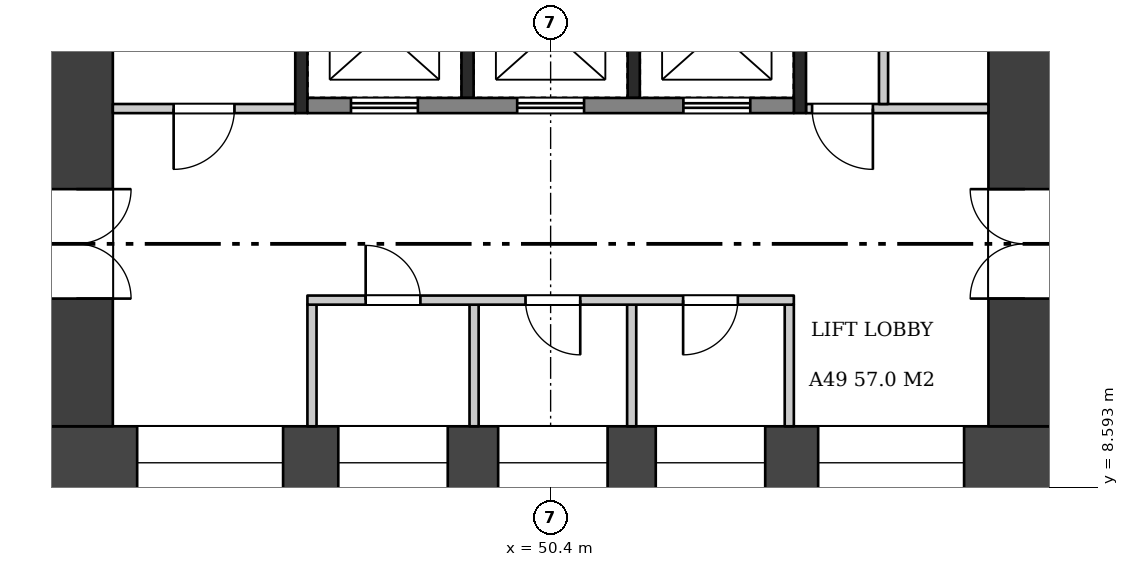
"""IFC4 building model, lengths in metres.
Left out: names, types, materials, properties, quantities, classifications, styles, units other than length and angle.
Written with IfcOpenShell. Run it as: python <this file> out.ifc"""

import sys

from ifc_helpers import new_model, si_unit, direction, frame, frame_2d, origin, place, context, subcontext, project, spatial, rectangle, extrude, element, fill, save


model = new_model("IFC4")
c1 = context("Model", 3, precision=1e-05, world=origin(), true_north=direction((0.0, 1.0)))
c2 = subcontext(c1, "Body", "Model", "MODEL_VIEW")
j1 = project(units=[si_unit("LENGTHUNIT", "METRE"), si_unit("PLANEANGLEUNIT", "RADIAN")], contexts=[c1])
p1 = place(None, origin())
s1 = spatial("IfcSite", under=j1, at=p1, CompositionType="ELEMENT")
p2 = place(p1, origin())
s2 = spatial("IfcBuilding", under=s1, at=p2, CompositionType="ELEMENT")
p3 = place(p2, frame((0.0, 0.0, 189.7)))
s3 = spatial("IfcBuildingStorey", under=s2, at=p3, CompositionType="ELEMENT", Elevation=189.7)
p4 = place(p3, frame((42.0, 9.0, 0.0), z_axis=(0.0, 0.0, 1.0), x_axis=(1.0, 0.0, 0.0)))
e1 = element("IfcWall", 1, at=p4, inside=s3, PredefinedType="SHEAR", context=c2, shape_type="SweptSolid", body=[
    extrude(rectangle(XDim=16.8, YDim=1.2, at=frame_2d((8.4, 0.0))), origin(), (0.0, 0.0, 1.0), 3.22),
])
p5 = place(p4, frame((1.6, 0.0, 0.6)))
e2 = element("IfcOpeningElement", 2, at=p5, cuts=e1, PredefinedType="OPENING", context=c2, shape_type="SweptSolid", body=[
    extrude(rectangle(XDim=2.4, YDim=2.1, at=frame_2d((1.2, 1.05))), frame((0.0, 0.61, 0.0), z_axis=(0.0, -1.0, 0.0), x_axis=(1.0, 0.0, 0.0)), (0.0, 0.0, 1.0), 1.22),
])
p6 = place(p4, frame((4.908, 0.0, 1.6)))
e3 = element("IfcOpeningElement", 3, at=p6, cuts=e1, PredefinedType="OPENING", context=c2, shape_type="SweptSolid", body=[
    extrude(rectangle(XDim=1.8, YDim=1.2, at=frame_2d((0.9, 0.6))), frame((0.0, 0.61, 0.0), z_axis=(0.0, -1.0, 0.0), x_axis=(1.0, 0.0, 0.0)), (0.0, 0.0, 1.0), 1.22),
])
p7 = place(p4, frame((7.537, 0.0, 1.6)))
e4 = element("IfcOpeningElement", 4, at=p7, cuts=e1, PredefinedType="OPENING", context=c2, shape_type="SweptSolid", body=[
    extrude(rectangle(XDim=1.8, YDim=1.2, at=frame_2d((0.9, 0.6))), frame((0.0, 0.61, 0.0), z_axis=(0.0, -1.0, 0.0), x_axis=(1.0, 0.0, 0.0)), (0.0, 0.0, 1.0), 1.22),
])
p8 = place(p4, frame((10.129, 0.0, 1.6)))
e5 = element("IfcOpeningElement", 5, at=p8, cuts=e1, PredefinedType="OPENING", context=c2, shape_type="SweptSolid", body=[
    extrude(rectangle(XDim=1.8, YDim=1.2, at=frame_2d((0.9, 0.6))), frame((0.0, 0.61, 0.0), z_axis=(0.0, -1.0, 0.0), x_axis=(1.0, 0.0, 0.0)), (0.0, 0.0, 1.0), 1.22),
])
p9 = place(p4, frame((12.8, 0.0, 0.6)))
e6 = element("IfcOpeningElement", 6, at=p9, cuts=e1, PredefinedType="OPENING", context=c2, shape_type="SweptSolid", body=[
    extrude(rectangle(XDim=2.4, YDim=2.1, at=frame_2d((1.2, 1.05))), frame((0.0, 0.61, 0.0), z_axis=(0.0, -1.0, 0.0), x_axis=(1.0, 0.0, 0.0)), (0.0, 0.0, 1.0), 1.22),
])
p10 = place(p3, frame((42.6, 9.6, 0.0), z_axis=(0.0, 0.0, 1.0), x_axis=(0.0, 1.0, 0.0)))
e7 = element("IfcWall", 7, at=p10, inside=s3, PredefinedType="SHEAR", context=c2, shape_type="SweptSolid", body=[
    extrude(rectangle(XDim=14.4, YDim=1.2, at=frame_2d((7.2, 0.0))), origin(), (0.0, 0.0, 1.0), 3.22),
])
p11 = place(p10, frame((2.1, 0.0, 0.0)))
e8 = element("IfcOpeningElement", 8, at=p11, cuts=e7, PredefinedType="OPENING", context=c2, shape_type="SweptSolid", body=[
    extrude(rectangle(XDim=1.8, YDim=2.1, at=frame_2d((0.9, 1.05))), frame((0.0, 0.61, 0.0), z_axis=(0.0, -1.0, 0.0), x_axis=(1.0, 0.0, 0.0)), (0.0, 0.0, 1.0), 1.22),
])
p12 = place(p3, frame((58.2, 9.6, 0.0), z_axis=(0.0, 0.0, 1.0), x_axis=(0.0, 1.0, 0.0)))
e9 = element("IfcWall", 9, at=p12, inside=s3, PredefinedType="SHEAR", context=c2, shape_type="SweptSolid", body=[
    extrude(rectangle(XDim=14.4, YDim=1.2, at=frame_2d((7.2, 0.0))), origin(), (0.0, 0.0, 1.0), 3.22),
])
p13 = place(p12, frame((2.1, 0.0, 0.0)))
e10 = element("IfcOpeningElement", 10, at=p13, cuts=e9, PredefinedType="OPENING", context=c2, shape_type="SweptSolid", body=[
    extrude(rectangle(XDim=1.8, YDim=2.1, at=frame_2d((0.9, 1.05))), frame((0.0, 0.61, 0.0), z_axis=(0.0, -1.0, 0.0), x_axis=(1.0, 0.0, 0.0)), (0.0, 0.0, 1.0), 1.22),
])
for number, where, z_axis, x_axis in (
    (11, (46.475, 9.6, 0.0), (0.0, 0.0, 1.0), (0.0, 1.0, 0.0)),
    (12, (54.325, 9.6, 0.0), (0.0, 0.0, 1.0), (0.0, 1.0, 0.0)),
    (13, (49.141, 9.6, 0.0), (0.0, 0.0, 1.0), (0.0, 1.0, 0.0)),
    (14, (51.733, 9.6, 0.0), (0.0, 0.0, 1.0), (0.0, 1.0, 0.0)),
):
    element("IfcWall", number, at=place(p3, frame(where, z_axis=z_axis, x_axis=x_axis)), inside=s3, PredefinedType="PARTITIONING", context=c2, shape_type="SweptSolid", body=[
        extrude(rectangle(XDim=2.0, YDim=0.15, at=frame_2d((1.0, 0.0))), origin(), (0.0, 0.0, 1.0), 3.22),
    ])
p14 = place(p3, frame((46.4, 11.675, 0.0), z_axis=(0.0, 0.0, 1.0), x_axis=(1.0, 0.0, 0.0)))
e15 = element("IfcWall", 15, at=p14, inside=s3, PredefinedType="PARTITIONING", context=c2, shape_type="SweptSolid", body=[
    extrude(rectangle(XDim=8.0, YDim=0.15, at=frame_2d((4.0, 0.0))), origin(), (0.0, 0.0, 1.0), 3.22),
])
p15 = place(p14, frame((0.958, 0.0, 0.0)))
e16 = element("IfcOpeningElement", 16, at=p15, cuts=e15, PredefinedType="OPENING", context=c2, shape_type="SweptSolid", body=[
    extrude(rectangle(XDim=0.9, YDim=2.1, at=frame_2d((0.45, 1.05))), frame((0.0, 0.085, 0.0), z_axis=(0.0, -1.0, 0.0), x_axis=(1.0, 0.0, 0.0)), (0.0, 0.0, 1.0), 0.17),
])
p16 = place(p14, frame((3.587, 0.0, 0.0)))
e17 = element("IfcOpeningElement", 17, at=p16, cuts=e15, PredefinedType="OPENING", context=c2, shape_type="SweptSolid", body=[
    extrude(rectangle(XDim=0.9, YDim=2.1, at=frame_2d((0.45, 1.05))), frame((0.0, 0.085, 0.0), z_axis=(0.0, -1.0, 0.0), x_axis=(1.0, 0.0, 0.0)), (0.0, 0.0, 1.0), 0.17),
])
p17 = place(p14, frame((6.179, 0.0, 0.0)))
e18 = element("IfcOpeningElement", 18, at=p17, cuts=e15, PredefinedType="OPENING", context=c2, shape_type="SweptSolid", body=[
    extrude(rectangle(XDim=0.9, YDim=2.1, at=frame_2d((0.45, 1.05))), frame((0.0, 0.085, 0.0), z_axis=(0.0, -1.0, 0.0), x_axis=(1.0, 0.0, 0.0)), (0.0, 0.0, 1.0), 0.17),
])
for number, where, z_axis, x_axis in (
    (19, (49.033, 15.0, 0.0), (0.0, 0.0, 1.0), (0.0, 1.0, 0.0)),
    (20, (51.767, 15.0, 0.0), (0.0, 0.0, 1.0), (0.0, 1.0, 0.0)),
):
    element("IfcWall", number, at=place(p3, frame(where, z_axis=z_axis, x_axis=x_axis)), inside=s3, PredefinedType="SHEAR", context=c2, shape_type="SweptSolid", body=[
        extrude(rectangle(XDim=1.9, YDim=0.2, at=frame_2d((0.95, 0.0))), origin(), (0.0, 0.0, 1.0), 3.22),
    ])
p18 = place(p3, frame((46.4, 14.875, 0.0), z_axis=(0.0, 0.0, 1.0), x_axis=(1.0, 0.0, 0.0)))
e21 = element("IfcWall", 21, at=p18, inside=s3, PredefinedType="SHEAR", context=c2, shape_type="SweptSolid", body=[
    extrude(rectangle(XDim=8.0, YDim=0.25, at=frame_2d((4.0, 0.0))), origin(), (0.0, 0.0, 1.0), 3.22),
])
p19 = place(p18, frame((0.717, 0.0, 0.0)))
e22 = element("IfcOpeningElement", 22, at=p19, cuts=e21, PredefinedType="OPENING", context=c2, shape_type="SweptSolid", body=[
    extrude(rectangle(XDim=1.1, YDim=2.1, at=frame_2d((0.55, 1.05))), frame((0.0, 0.135, 0.0), z_axis=(0.0, -1.0, 0.0), x_axis=(1.0, 0.0, 0.0)), (0.0, 0.0, 1.0), 0.27),
])
p20 = place(p18, frame((3.45, 0.0, 0.0)))
e23 = element("IfcOpeningElement", 23, at=p20, cuts=e21, PredefinedType="OPENING", context=c2, shape_type="SweptSolid", body=[
    extrude(rectangle(XDim=1.1, YDim=2.1, at=frame_2d((0.55, 1.05))), frame((0.0, 0.135, 0.0), z_axis=(0.0, -1.0, 0.0), x_axis=(1.0, 0.0, 0.0)), (0.0, 0.0, 1.0), 0.27),
])
p21 = place(p18, frame((6.183, 0.0, 0.0)))
e24 = element("IfcOpeningElement", 24, at=p21, cuts=e21, PredefinedType="OPENING", context=c2, shape_type="SweptSolid", body=[
    extrude(rectangle(XDim=1.1, YDim=2.1, at=frame_2d((0.55, 1.05))), frame((0.0, 0.135, 0.0), z_axis=(0.0, -1.0, 0.0), x_axis=(1.0, 0.0, 0.0)), (0.0, 0.0, 1.0), 0.27),
])
p22 = place(p3, frame((46.3, 14.75, 0.0), z_axis=(0.0, 0.0, 1.0), x_axis=(0.0, 1.0, 0.0)))
e25 = element("IfcWall", 25, at=p22, inside=s3, PredefinedType="SHEAR", context=c2, shape_type="SweptSolid", body=[
    extrude(rectangle(XDim=2.4, YDim=0.2, at=frame_2d((1.2, 0.0))), origin(), (0.0, 0.0, 1.0), 3.22),
])
p23 = place(p3, frame((43.2, 14.825, 0.0), z_axis=(0.0, 0.0, 1.0), x_axis=(1.0, 0.0, 0.0)))
e26 = element("IfcWall", 26, at=p23, inside=s3, PredefinedType="PARTITIONING", context=c2, shape_type="SweptSolid", body=[
    extrude(rectangle(XDim=3.0, YDim=0.15, at=frame_2d((1.5, 0.0))), origin(), (0.0, 0.0, 1.0), 3.22),
])
p24 = place(p23, frame((1.0, 0.0, 0.0)))
e27 = element("IfcOpeningElement", 27, at=p24, cuts=e26, PredefinedType="OPENING", context=c2, shape_type="SweptSolid", body=[
    extrude(rectangle(XDim=1.0, YDim=2.1, at=frame_2d((0.5, 1.05))), frame((0.0, 0.085, 0.0), z_axis=(0.0, -1.0, 0.0), x_axis=(1.0, 0.0, 0.0)), (0.0, 0.0, 1.0), 0.17),
])
p25 = place(p3, frame((54.5, 14.75, 0.0), z_axis=(0.0, 0.0, 1.0), x_axis=(0.0, 1.0, 0.0)))
e28 = element("IfcWall", 28, at=p25, inside=s3, PredefinedType="SHEAR", context=c2, shape_type="SweptSolid", body=[
    extrude(rectangle(XDim=9.25, YDim=0.2, at=frame_2d((4.625, 0.0))), origin(), (0.0, 0.0, 1.0), 3.22),
])
p26 = place(p3, frame((54.6, 14.825, 0.0), z_axis=(0.0, 0.0, 1.0), x_axis=(1.0, 0.0, 0.0)))
e29 = element("IfcWall", 29, at=p26, inside=s3, PredefinedType="PARTITIONING", context=c2, shape_type="SweptSolid", body=[
    extrude(rectangle(XDim=3.0, YDim=0.15, at=frame_2d((1.5, 0.0))), origin(), (0.0, 0.0, 1.0), 3.22),
])
p27 = place(p26, frame((0.1, 0.0, 0.0)))
e30 = element("IfcOpeningElement", 30, at=p27, cuts=e29, PredefinedType="OPENING", context=c2, shape_type="SweptSolid", body=[
    extrude(rectangle(XDim=1.0, YDim=2.1, at=frame_2d((0.5, 1.05))), frame((0.0, 0.085, 0.0), z_axis=(0.0, -1.0, 0.0), x_axis=(1.0, 0.0, 0.0)), (0.0, 0.0, 1.0), 0.17),
])
p28 = place(p3, frame((55.875, 14.9, 0.0), z_axis=(0.0, 0.0, 1.0), x_axis=(0.0, 1.0, 0.0)))
e31 = element("IfcWall", 31, at=p28, inside=s3, PredefinedType="PARTITIONING", context=c2, shape_type="SweptSolid", body=[
    extrude(rectangle(XDim=9.1, YDim=0.15, at=frame_2d((4.55, 0.0))), origin(), (0.0, 0.0, 1.0), 3.22),
])
p29 = place(p28, frame((1.04, 0.0, 0.0)))
e32 = element("IfcOpeningElement", 32, at=p29, cuts=e31, PredefinedType="OPENING", context=c2, shape_type="SweptSolid", body=[
    extrude(rectangle(XDim=1.0, YDim=2.1, at=frame_2d((0.5, 1.05))), frame((0.0, 0.085, 0.0), z_axis=(0.0, -1.0, 0.0), x_axis=(1.0, 0.0, 0.0)), (0.0, 0.0, 1.0), 0.17),
])
p30 = place(p28, frame((4.32, 0.0, 0.0)))
e33 = element("IfcOpeningElement", 33, at=p30, cuts=e31, PredefinedType="OPENING", context=c2, shape_type="SweptSolid", body=[
    extrude(rectangle(XDim=0.9, YDim=2.1, at=frame_2d((0.45, 1.05))), frame((0.0, 0.085, 0.0), z_axis=(0.0, -1.0, 0.0), x_axis=(1.0, 0.0, 0.0)), (0.0, 0.0, 1.0), 0.17),
])
p31 = place(p28, frame((7.33, 0.0, 0.0)))
e34 = element("IfcOpeningElement", 34, at=p31, cuts=e31, PredefinedType="OPENING", context=c2, shape_type="SweptSolid", body=[
    extrude(rectangle(XDim=0.9, YDim=2.1, at=frame_2d((0.45, 1.05))), frame((0.0, 0.085, 0.0), z_axis=(0.0, -1.0, 0.0), x_axis=(1.0, 0.0, 0.0)), (0.0, 0.0, 1.0), 0.17),
])
p32 = place(p11, frame((1.8, 0.0, 0.0), z_axis=(0.0, 0.0, 1.0), x_axis=(-1.0, 0.0, 0.0)))
e35 = element("IfcDoor", 35, at=p32, inside=s3, OperationType="DOUBLE_DOOR_SINGLE_SWING", PredefinedType="DOOR", context=c2, shape_type="SweptSolid", body=[
    extrude(rectangle(XDim=1.8, YDim=2.1, at=frame_2d((0.9, 1.05))), frame((0.0, 0.025, 0.0), z_axis=(0.0, -1.0, 0.0), x_axis=(1.0, 0.0, 0.0)), (0.0, 0.0, 1.0), 0.05),
])
fill(e8, e35)
p33 = place(p13, origin())
e36 = element("IfcDoor", 36, at=p33, inside=s3, OperationType="DOUBLE_DOOR_SINGLE_SWING", PredefinedType="DOOR", context=c2, shape_type="SweptSolid", body=[
    extrude(rectangle(XDim=1.8, YDim=2.1, at=frame_2d((0.9, 1.05))), frame((0.0, 0.025, 0.0), z_axis=(0.0, -1.0, 0.0), x_axis=(1.0, 0.0, 0.0)), (0.0, 0.0, 1.0), 0.05),
])
fill(e10, e36)
p34 = place(p15, origin())
e37 = element("IfcDoor", 37, at=p34, inside=s3, OperationType="SINGLE_SWING_LEFT", PredefinedType="DOOR", context=c2, shape_type="SweptSolid", body=[
    extrude(rectangle(XDim=0.9, YDim=2.1, at=frame_2d((0.45, 1.05))), frame((0.0, 0.025, 0.0), z_axis=(0.0, -1.0, 0.0), x_axis=(1.0, 0.0, 0.0)), (0.0, 0.0, 1.0), 0.05),
])
fill(e16, e37)
p35 = place(p16, frame((0.9, 0.0, 0.0), z_axis=(0.0, 0.0, 1.0), x_axis=(-1.0, 0.0, 0.0)))
e38 = element("IfcDoor", 38, at=p35, inside=s3, OperationType="SINGLE_SWING_LEFT", PredefinedType="DOOR", context=c2, shape_type="SweptSolid", body=[
    extrude(rectangle(XDim=0.9, YDim=2.1, at=frame_2d((0.45, 1.05))), frame((0.0, 0.025, 0.0), z_axis=(0.0, -1.0, 0.0), x_axis=(1.0, 0.0, 0.0)), (0.0, 0.0, 1.0), 0.05),
])
fill(e17, e38)
p36 = place(p17, frame((0.9, 0.0, 0.0), z_axis=(0.0, 0.0, 1.0), x_axis=(-1.0, 0.0, 0.0)))
e39 = element("IfcDoor", 39, at=p36, inside=s3, OperationType="SINGLE_SWING_RIGHT", PredefinedType="DOOR", context=c2, shape_type="SweptSolid", body=[
    extrude(rectangle(XDim=0.9, YDim=2.1, at=frame_2d((0.45, 1.05))), frame((0.0, 0.025, 0.0), z_axis=(0.0, -1.0, 0.0), x_axis=(1.0, 0.0, 0.0)), (0.0, 0.0, 1.0), 0.05),
])
fill(e18, e39)
p37 = place(p19, origin())
e40 = element("IfcDoor", 40, at=p37, inside=s3, OperationType="DOUBLE_DOOR_SLIDING", PredefinedType="DOOR", context=c2, shape_type="SweptSolid", body=[
    extrude(rectangle(XDim=1.1, YDim=2.1, at=frame_2d((0.55, 1.05))), frame((0.0, 0.025, 0.0), z_axis=(0.0, -1.0, 0.0), x_axis=(1.0, 0.0, 0.0)), (0.0, 0.0, 1.0), 0.05),
])
fill(e22, e40)
p38 = place(p20, origin())
e41 = element("IfcDoor", 41, at=p38, inside=s3, OperationType="DOUBLE_DOOR_SLIDING", PredefinedType="DOOR", context=c2, shape_type="SweptSolid", body=[
    extrude(rectangle(XDim=1.1, YDim=2.1, at=frame_2d((0.55, 1.05))), frame((0.0, 0.025, 0.0), z_axis=(0.0, -1.0, 0.0), x_axis=(1.0, 0.0, 0.0)), (0.0, 0.0, 1.0), 0.05),
])
fill(e23, e41)
p39 = place(p21, origin())
e42 = element("IfcDoor", 42, at=p39, inside=s3, OperationType="DOUBLE_DOOR_SLIDING", PredefinedType="DOOR", context=c2, shape_type="SweptSolid", body=[
    extrude(rectangle(XDim=1.1, YDim=2.1, at=frame_2d((0.55, 1.05))), frame((0.0, 0.025, 0.0), z_axis=(0.0, -1.0, 0.0), x_axis=(1.0, 0.0, 0.0)), (0.0, 0.0, 1.0), 0.05),
])
fill(e24, e42)
p40 = place(p24, frame((1.0, 0.0, 0.0), z_axis=(0.0, 0.0, 1.0), x_axis=(-1.0, 0.0, 0.0)))
e43 = element("IfcDoor", 43, at=p40, inside=s3, OperationType="SINGLE_SWING_RIGHT", PredefinedType="DOOR", context=c2, shape_type="SweptSolid", body=[
    extrude(rectangle(XDim=1.0, YDim=2.1, at=frame_2d((0.5, 1.05))), frame((0.0, 0.025, 0.0), z_axis=(0.0, -1.0, 0.0), x_axis=(1.0, 0.0, 0.0)), (0.0, 0.0, 1.0), 0.05),
])
fill(e27, e43)
p41 = place(p27, frame((1.0, 0.0, 0.0), z_axis=(0.0, 0.0, 1.0), x_axis=(-1.0, 0.0, 0.0)))
e44 = element("IfcDoor", 44, at=p41, inside=s3, OperationType="SINGLE_SWING_LEFT", PredefinedType="DOOR", context=c2, shape_type="SweptSolid", body=[
    extrude(rectangle(XDim=1.0, YDim=2.1, at=frame_2d((0.5, 1.05))), frame((0.0, 0.025, 0.0), z_axis=(0.0, -1.0, 0.0), x_axis=(1.0, 0.0, 0.0)), (0.0, 0.0, 1.0), 0.05),
])
fill(e30, e44)
p42 = place(p5, origin())
e45 = element("IfcWindow", 45, at=p42, inside=s3, PartitioningType="SINGLE_PANEL", PredefinedType="WINDOW", context=c2, shape_type="SweptSolid", body=[
    extrude(rectangle(XDim=2.4, YDim=2.1, at=frame_2d((1.2, 1.05))), frame((0.0, 0.03, 0.0), z_axis=(0.0, -1.0, 0.0), x_axis=(1.0, 0.0, 0.0)), (0.0, 0.0, 1.0), 0.06),
])
fill(e2, e45)
p43 = place(p6, origin())
e46 = element("IfcWindow", 46, at=p43, inside=s3, PartitioningType="SINGLE_PANEL", PredefinedType="WINDOW", context=c2, shape_type="SweptSolid", body=[
    extrude(rectangle(XDim=1.8, YDim=1.2, at=frame_2d((0.9, 0.6))), frame((0.0, 0.03, 0.0), z_axis=(0.0, -1.0, 0.0), x_axis=(1.0, 0.0, 0.0)), (0.0, 0.0, 1.0), 0.06),
])
fill(e3, e46)
p44 = place(p7, origin())
e47 = element("IfcWindow", 47, at=p44, inside=s3, PartitioningType="SINGLE_PANEL", PredefinedType="WINDOW", context=c2, shape_type="SweptSolid", body=[
    extrude(rectangle(XDim=1.8, YDim=1.2, at=frame_2d((0.9, 0.6))), frame((0.0, 0.03, 0.0), z_axis=(0.0, -1.0, 0.0), x_axis=(1.0, 0.0, 0.0)), (0.0, 0.0, 1.0), 0.06),
])
fill(e4, e47)
p45 = place(p8, origin())
e48 = element("IfcWindow", 48, at=p45, inside=s3, PartitioningType="SINGLE_PANEL", PredefinedType="WINDOW", context=c2, shape_type="SweptSolid", body=[
    extrude(rectangle(XDim=1.8, YDim=1.2, at=frame_2d((0.9, 0.6))), frame((0.0, 0.03, 0.0), z_axis=(0.0, -1.0, 0.0), x_axis=(1.0, 0.0, 0.0)), (0.0, 0.0, 1.0), 0.06),
])
fill(e5, e48)
p46 = place(p9, origin())
e49 = element("IfcWindow", 49, at=p46, inside=s3, PartitioningType="SINGLE_PANEL", PredefinedType="WINDOW", context=c2, shape_type="SweptSolid", body=[
    extrude(rectangle(XDim=2.4, YDim=2.1, at=frame_2d((1.2, 1.05))), frame((0.0, 0.03, 0.0), z_axis=(0.0, -1.0, 0.0), x_axis=(1.0, 0.0, 0.0)), (0.0, 0.0, 1.0), 0.06),
])
fill(e6, e49)
save(model, sys.argv[1])
